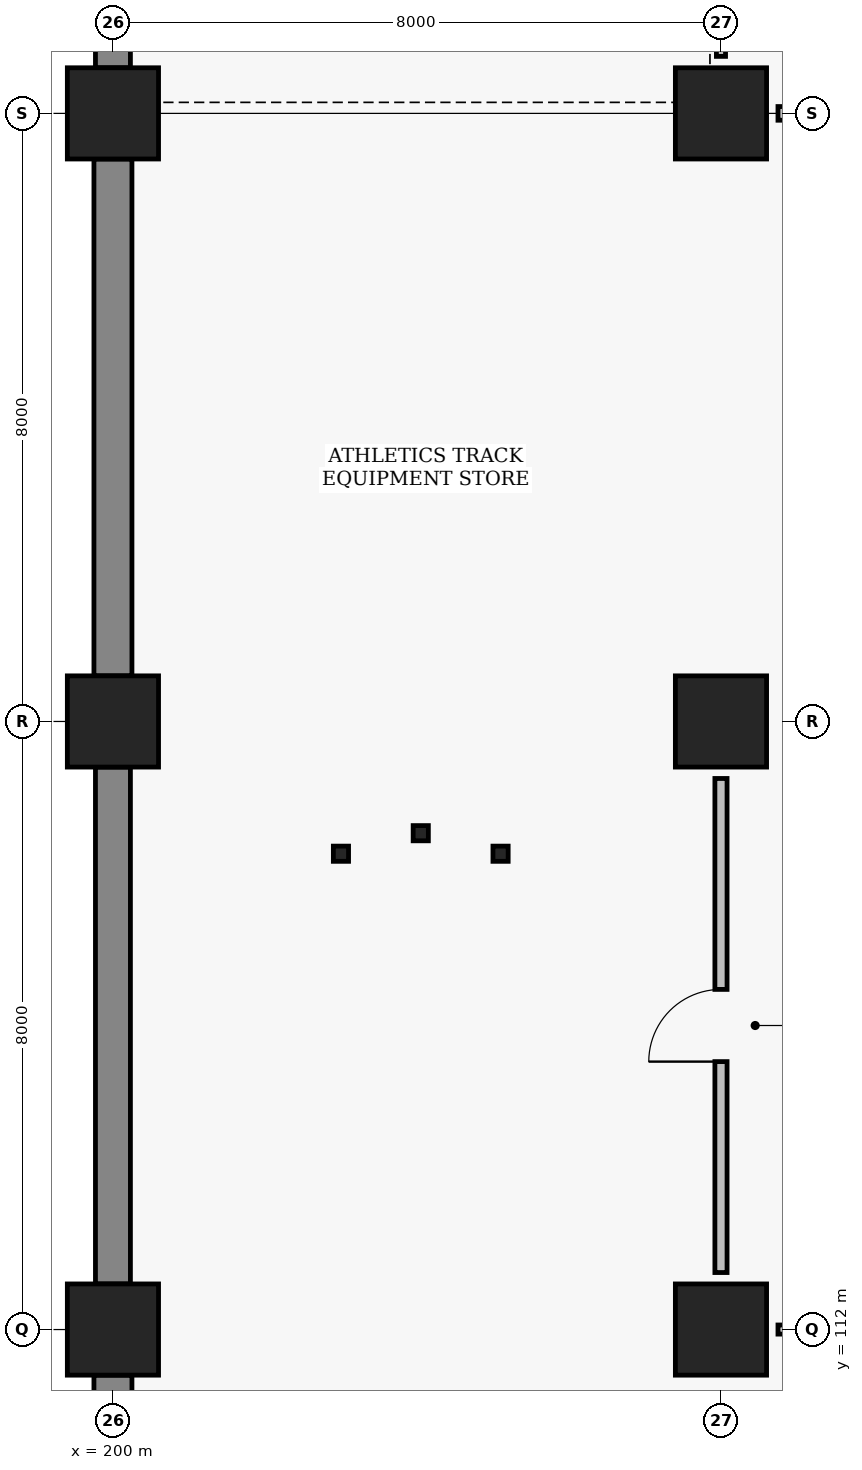
"""IFC4 building model, lengths in metres.
Left out: names, types, materials, properties, quantities, classifications, styles, units other than length and angle.
Written with IfcOpenShell. Run it as: python <this file> out.ifc"""

import sys

from ifc_helpers import new_model, si_unit, direction, frame, frame_2d, origin, origin_2d, place, context, subcontext, project, spatial, rectangle, hollow_rectangle, extrude, element, fill, save


model = new_model("IFC4")
c1 = context("Model", 3, precision=1e-05, world=origin(), true_north=direction((0.0, 1.0)))
c2 = subcontext(c1, "Body", "Model", "MODEL_VIEW")
j1 = project(units=[si_unit("LENGTHUNIT", "METRE"), si_unit("PLANEANGLEUNIT", "RADIAN")], contexts=[c1])
p1 = place(None, origin())
s1 = spatial("IfcSite", under=j1, at=p1, CompositionType="ELEMENT")
p2 = place(p1, origin())
s2 = spatial("IfcBuilding", under=s1, at=p2, CompositionType="ELEMENT")
p3 = place(p2, frame((0.0, 0.0, -5.4)))
s3 = spatial("IfcBuildingStorey", under=s2, at=p3, CompositionType="ELEMENT", Elevation=-5.4)
for number, where, z_axis, x_axis in (
    (1, (200.0, 112.0, 0.0), (0.0, 0.0, 1.0), (1.0, 0.0, 0.0)),
    (2, (200.0, 120.0, 0.0), (0.0, 0.0, 1.0), (1.0, 0.0, 0.0)),
    (3, (200.0, 128.0, 0.0), (0.0, 0.0, 1.0), (1.0, 0.0, 0.0)),
    (4, (208.0, 112.0, 0.0), (0.0, 0.0, 1.0), (1.0, 0.0, 0.0)),
    (5, (208.0, 120.0, 0.0), (0.0, 0.0, 1.0), (1.0, 0.0, 0.0)),
    (6, (208.0, 128.0, 0.0), (0.0, 0.0, 1.0), (1.0, 0.0, 0.0)),
):
    element("IfcColumn", number, at=place(p3, frame(where, z_axis=z_axis, x_axis=x_axis)), inside=s3, PredefinedType="COLUMN", context=c2, shape_type="SweptSolid", body=[
        extrude(rectangle(XDim=1.2, YDim=1.2, at=origin_2d()), origin(), (0.0, 0.0, 1.0), 5.4),
    ])
p4 = place(p3, frame((200.0, 104.6, 0.0), z_axis=(0.0, 0.0, 1.0), x_axis=(0.0, 1.0, 0.0)))
e7 = element("IfcWall", 7, at=p4, inside=s3, PredefinedType="STANDARD", context=c2, shape_type="SweptSolid", body=[
    extrude(rectangle(XDim=6.8, YDim=0.5, at=frame_2d((3.4, 0.0))), origin(), (0.0, 0.0, 1.0), 4.24),
])
p5 = place(p3, frame((200.0, 112.6, 0.0), z_axis=(0.0, 0.0, 1.0), x_axis=(0.0, 1.0, 0.0)))
e8 = element("IfcWall", 8, at=p5, inside=s3, PredefinedType="STANDARD", context=c2, shape_type="SweptSolid", body=[
    extrude(rectangle(XDim=6.8, YDim=0.46, at=frame_2d((3.4, 0.0))), origin(), (0.0, 0.0, 1.0), 4.24),
])
p6 = place(p3, frame((200.0, 120.6, 0.0), z_axis=(0.0, 0.0, 1.0), x_axis=(0.0, 1.0, 0.0)))
e9 = element("IfcWall", 9, at=p6, inside=s3, PredefinedType="STANDARD", context=c2, shape_type="SweptSolid", body=[
    extrude(rectangle(XDim=6.8, YDim=0.5, at=frame_2d((3.4, 0.0))), origin(), (0.0, 0.0, 1.0), 4.24),
])
p7 = place(p3, frame((200.0, 128.6, 0.0), z_axis=(0.0, 0.0, 1.0), x_axis=(0.0, 1.0, 0.0)))
e10 = element("IfcWall", 10, at=p7, inside=s3, PredefinedType="STANDARD", context=c2, shape_type="SweptSolid", body=[
    extrude(rectangle(XDim=6.95, YDim=0.46, at=frame_2d((3.475, 0.0))), origin(), (0.0, 0.0, 1.0), 3.69),
])
for number, where, z_axis, x_axis in (
    (11, (203.0, 118.26, 0.0), (0.0, 0.0, 1.0), (1.0, 0.0, 0.0)),
    (12, (205.1, 118.26, 0.0), (0.0, 0.0, 1.0), (1.0, 0.0, 0.0)),
    (13, (204.05, 118.53, 0.0), (0.0, 0.0, 1.0), (1.0, 0.0, 0.0)),
):
    element("IfcColumn", number, at=place(p3, frame(where, z_axis=z_axis, x_axis=x_axis)), inside=s3, PredefinedType="COLUMN", context=c2, shape_type="SweptSolid", body=[
        extrude(hollow_rectangle(XDim=0.2, YDim=0.2, WallThickness=0.009, at=origin_2d()), origin(), (0.0, 0.0, 1.0), 5.4),
    ])
p8 = place(p3, frame((208.0, 112.75, 0.0), z_axis=(0.0, 0.0, 1.0), x_axis=(0.0, 1.0, 0.0)))
e14 = element("IfcWall", 14, at=p8, inside=s3, PredefinedType="PARTITIONING", context=c2, shape_type="SweptSolid", body=[
    extrude(rectangle(XDim=6.5, YDim=0.16, at=frame_2d((3.25, 0.0))), origin(), (0.0, 0.0, 1.0), 4.39),
])
p9 = place(p8, frame((2.775, 0.0, 0.0)))
e15 = element("IfcOpeningElement", 15, at=p9, cuts=e14, PredefinedType="OPENING", context=c2, shape_type="SweptSolid", body=[
    extrude(rectangle(XDim=0.95, YDim=2.1, at=frame_2d((0.475, 1.05))), frame((0.0, 0.09, 0.0), z_axis=(0.0, -1.0, 0.0), x_axis=(1.0, 0.0, 0.0)), (0.0, 0.0, 1.0), 0.18),
])
p10 = place(p3, frame((208.0, 128.75, 0.0), z_axis=(0.0, 0.0, 1.0), x_axis=(0.0, 1.0, 0.0)))
e16 = element("IfcWall", 16, at=p10, inside=s3, PredefinedType="PARTITIONING", context=c2, shape_type="SweptSolid", body=[
    extrude(rectangle(XDim=6.5, YDim=0.12, at=frame_2d((3.25, 0.0))), origin(), (0.0, 0.0, 1.0), 3.69),
])
p11 = place(p10, frame((2.75, 0.0, 0.0)))
e17 = element("IfcOpeningElement", 17, at=p11, cuts=e16, PredefinedType="OPENING", context=c2, shape_type="SweptSolid", body=[
    extrude(rectangle(XDim=1.0, YDim=2.1, at=frame_2d((0.5, 1.05))), frame((0.0, 0.07, 0.0), z_axis=(0.0, -1.0, 0.0), x_axis=(1.0, 0.0, 0.0)), (0.0, 0.0, 1.0), 0.14),
])
p12 = place(p3, frame((208.75, 112.0, 0.0), z_axis=(0.0, 0.0, 1.0), x_axis=(1.0, 0.0, 0.0)))
e18 = element("IfcWall", 18, at=p12, inside=s3, PredefinedType="PARTITIONING", context=c2, shape_type="SweptSolid", body=[
    extrude(rectangle(XDim=6.5, YDim=0.12, at=frame_2d((3.25, 0.0))), origin(), (0.0, 0.0, 1.0), 4.49),
])
p13 = place(p12, frame((2.75, 0.0, 0.0)))
e19 = element("IfcOpeningElement", 19, at=p13, cuts=e18, PredefinedType="OPENING", context=c2, shape_type="SweptSolid", body=[
    extrude(rectangle(XDim=1.0, YDim=2.1, at=frame_2d((0.5, 1.05))), frame((0.0, 0.07, 0.0), z_axis=(0.0, -1.0, 0.0), x_axis=(1.0, 0.0, 0.0)), (0.0, 0.0, 1.0), 0.14),
])
p14 = place(p3, frame((208.75, 128.0, 0.0), z_axis=(0.0, 0.0, 1.0), x_axis=(1.0, 0.0, 0.0)))
e20 = element("IfcWall", 20, at=p14, inside=s3, PredefinedType="PARTITIONING", context=c2, shape_type="SweptSolid", body=[
    extrude(rectangle(XDim=6.5, YDim=0.18, at=frame_2d((3.25, 0.0))), origin(), (0.0, 0.0, 1.0), 3.69),
])
p15 = place(p14, frame((2.55, 0.0, 0.0)))
e21 = element("IfcOpeningElement", 21, at=p15, cuts=e20, PredefinedType="OPENING", context=c2, shape_type="SweptSolid", body=[
    extrude(rectangle(XDim=1.4, YDim=2.2, at=frame_2d((0.7, 1.1))), frame((0.0, 0.1, 0.0), z_axis=(0.0, -1.0, 0.0), x_axis=(1.0, 0.0, 0.0)), (0.0, 0.0, 1.0), 0.2),
])
p16 = place(p9, origin())
e22 = element("IfcDoor", 22, at=p16, inside=s3, OperationType="SINGLE_SWING_LEFT", PredefinedType="DOOR", context=c2, shape_type="SweptSolid", body=[
    extrude(rectangle(XDim=0.95, YDim=2.1, at=frame_2d((0.475, 1.05))), frame((0.0, 0.025, 0.0), z_axis=(0.0, -1.0, 0.0), x_axis=(1.0, 0.0, 0.0)), (0.0, 0.0, 1.0), 0.05),
])
fill(e15, e22)
save(model, sys.argv[1])
